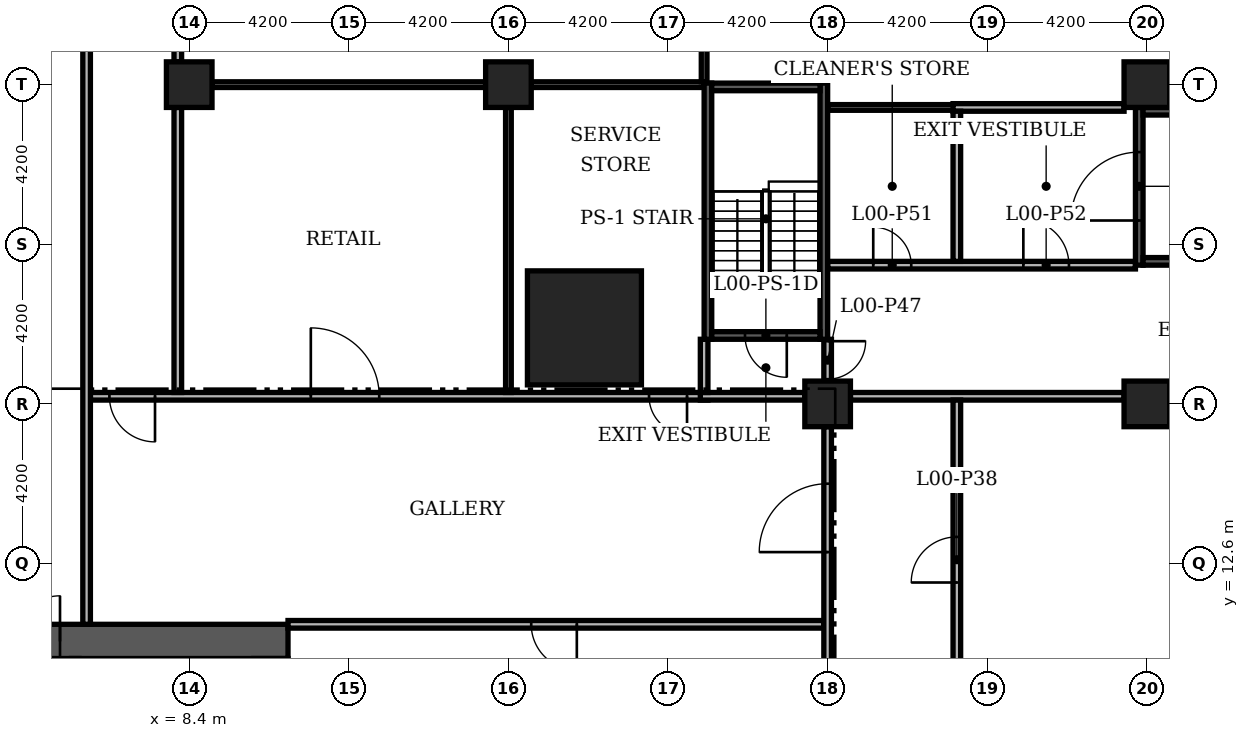
"""IFC4 building model, lengths in metres.
Left out: names, types, materials, properties, quantities, classifications, styles, units other than length and angle.
Written with IfcOpenShell. Run it as: python <this file> out.ifc"""

import sys

from ifc_helpers import new_model, si_unit, direction, frame, frame_2d, origin, origin_2d, place, context, subcontext, project, spatial, rectangle, extrude, element, fill, save


model = new_model("IFC4")
c1 = context("Model", 3, precision=1e-05, world=origin(), true_north=direction((0.0, 1.0)))
c2 = subcontext(c1, "Body", "Model", "MODEL_VIEW")
j1 = project(units=[si_unit("LENGTHUNIT", "METRE"), si_unit("PLANEANGLEUNIT", "RADIAN")], contexts=[c1])
p1 = place(None, origin())
s1 = spatial("IfcSite", under=j1, at=p1, CompositionType="ELEMENT")
p2 = place(p1, origin())
s2 = spatial("IfcBuilding", under=s1, at=p2, CompositionType="ELEMENT")
p3 = place(p2, origin())
s3 = spatial("IfcBuildingStorey", under=s2, at=p3, CompositionType="ELEMENT", Elevation=0.0)
p4 = place(p3, frame((-11.0, 10.55, 0.0), z_axis=(0.0, 0.0, 1.0), x_axis=(1.0, 0.0, 0.0)))
e1 = element("IfcWall", 1, at=p4, inside=s3, PredefinedType="SHEAR", context=c2, shape_type="SweptSolid", body=[
    extrude(rectangle(XDim=22.0, YDim=0.9, at=frame_2d((11.0, 0.0))), origin(), (0.0, 0.0, 1.0), 6.78),
])
p5 = place(p4, frame((12.6, 0.0, 0.0)))
e2 = element("IfcOpeningElement", 2, at=p5, cuts=e1, PredefinedType="OPENING", context=c2, shape_type="SweptSolid", body=[
    extrude(rectangle(XDim=1.2, YDim=2.2, at=frame_2d((0.6, 1.1))), frame((0.0, 0.46, 0.0), z_axis=(0.0, -1.0, 0.0), x_axis=(1.0, 0.0, 0.0)), (0.0, 0.0, 1.0), 0.92),
])
p6 = place(p4, frame((14.8, 0.0, 0.0)))
e3 = element("IfcOpeningElement", 3, at=p6, cuts=e1, PredefinedType="OPENING", context=c2, shape_type="SweptSolid", body=[
    extrude(rectangle(XDim=1.2, YDim=2.2, at=frame_2d((0.6, 1.1))), frame((0.0, 0.46, 0.0), z_axis=(0.0, -1.0, 0.0), x_axis=(1.0, 0.0, 0.0)), (0.0, 0.0, 1.0), 0.92),
])
p7 = place(p3, frame((18.8, 18.8, 0.0), z_axis=(0.0, 0.0, 1.0), x_axis=(1.0, 0.0, 0.0)))
e4 = element("IfcColumn", 4, at=p7, inside=s3, PredefinedType="COLUMN", context=c2, shape_type="SweptSolid", body=[
    extrude(rectangle(XDim=3.0, YDim=3.0, at=origin_2d()), origin(), (0.0, 0.0, 1.0), 7.2),
])
for number, where, z_axis, x_axis in (
    (5, (25.2, 16.8, 0.0), (0.0, 0.0, 1.0), (1.0, 0.0, 0.0)),
    (6, (8.4, 25.2, 0.0), (0.0, 0.0, 1.0), (1.0, 0.0, 0.0)),
    (7, (16.8, 25.2, 0.0), (0.0, 0.0, 1.0), (1.0, 0.0, 0.0)),
    (8, (33.6, 16.8, 0.0), (0.0, 0.0, 1.0), (1.0, 0.0, 0.0)),
    (9, (33.6, 25.2, 0.0), (0.0, 0.0, 1.0), (1.0, 0.0, 0.0)),
):
    element("IfcColumn", number, at=place(p3, frame(where, z_axis=z_axis, x_axis=x_axis)), inside=s3, PredefinedType="COLUMN", context=c2, shape_type="SweptSolid", body=[
        extrude(rectangle(XDim=1.2, YDim=1.2, at=origin_2d()), origin(), (0.0, 0.0, 1.0), 7.2),
    ])
p8 = place(p3, frame((11.0, 11.0, 0.0), z_axis=(0.0, 0.0, 1.0), x_axis=(1.0, 0.0, 0.0)))
e10 = element("IfcWall", 10, at=p8, inside=s3, PredefinedType="PARTITIONING", context=c2, shape_type="SweptSolid", body=[
    extrude(rectangle(XDim=14.1, YDim=0.2, at=frame_2d((7.05, 0.0))), origin(), (0.0, 0.0, 1.0), 6.78),
])
p9 = place(p8, frame((6.4, 0.0, 0.0)))
e11 = element("IfcOpeningElement", 11, at=p9, cuts=e10, PredefinedType="OPENING", context=c2, shape_type="SweptSolid", body=[
    extrude(rectangle(XDim=1.2, YDim=2.2, at=frame_2d((0.6, 1.1))), frame((0.0, 0.11, 0.0), z_axis=(0.0, -1.0, 0.0), x_axis=(1.0, 0.0, 0.0)), (0.0, 0.0, 1.0), 0.22),
])
p10 = place(p3, frame((5.8, 17.0, 0.0), z_axis=(0.0, 0.0, 1.0), x_axis=(1.0, 0.0, 0.0)))
e12 = element("IfcWall", 12, at=p10, inside=s3, PredefinedType="PARTITIONING", context=c2, shape_type="SweptSolid", body=[
    extrude(rectangle(XDim=16.25, YDim=0.2, at=frame_2d((8.125, 0.0))), origin(), (0.0, 0.0, 1.0), 6.78),
])
p11 = place(p10, frame((0.5, 0.0, 0.0)))
e13 = element("IfcOpeningElement", 13, at=p11, cuts=e12, PredefinedType="OPENING", context=c2, shape_type="SweptSolid", body=[
    extrude(rectangle(XDim=1.2, YDim=2.2, at=frame_2d((0.6, 1.1))), frame((0.0, 0.11, 0.0), z_axis=(0.0, -1.0, 0.0), x_axis=(1.0, 0.0, 0.0)), (0.0, 0.0, 1.0), 0.22),
])
p12 = place(p10, frame((5.8, 0.0, 0.0)))
e14 = element("IfcOpeningElement", 14, at=p12, cuts=e12, PredefinedType="OPENING", context=c2, shape_type="SweptSolid", body=[
    extrude(rectangle(XDim=1.8, YDim=2.2, at=frame_2d((0.9, 1.1))), frame((0.0, 0.11, 0.0), z_axis=(0.0, -1.0, 0.0), x_axis=(1.0, 0.0, 0.0)), (0.0, 0.0, 1.0), 0.22),
])
p13 = place(p10, frame((14.7, 0.0, 0.0)))
e15 = element("IfcOpeningElement", 15, at=p13, cuts=e12, PredefinedType="OPENING", context=c2, shape_type="SweptSolid", body=[
    extrude(rectangle(XDim=1.0, YDim=2.1, at=frame_2d((0.5, 1.05))), frame((0.0, 0.11, 0.0), z_axis=(0.0, -1.0, 0.0), x_axis=(1.0, 0.0, 0.0)), (0.0, 0.0, 1.0), 0.22),
])
p14 = place(p3, frame((21.85, 17.0, 0.0), z_axis=(0.0, 0.0, 1.0), x_axis=(1.0, 0.0, 0.0)))
e16 = element("IfcWall", 16, at=p14, inside=s3, PredefinedType="PARTITIONING", context=c2, shape_type="SweptSolid", body=[
    extrude(rectangle(XDim=2.75, YDim=0.2, at=frame_2d((1.375, 0.0))), origin(), (0.0, 0.0, 1.0), 6.78),
])
p15 = place(p3, frame((25.8, 17.0, 0.0), z_axis=(0.0, 0.0, 1.0), x_axis=(1.0, 0.0, 0.0)))
e17 = element("IfcWall", 17, at=p15, inside=s3, PredefinedType="PARTITIONING", context=c2, shape_type="SweptSolid", body=[
    extrude(rectangle(XDim=7.2, YDim=0.2, at=frame_2d((3.6, 0.0))), origin(), (0.0, 0.0, 1.0), 6.48),
])
p16 = place(p3, frame((25.2, 20.45, 0.0), z_axis=(0.0, 0.0, 1.0), x_axis=(1.0, 0.0, 0.0)))
e18 = element("IfcWall", 18, at=p16, inside=s3, PredefinedType="PARTITIONING", context=c2, shape_type="SweptSolid", body=[
    extrude(rectangle(XDim=8.1, YDim=0.2, at=frame_2d((4.05, 0.0))), origin(), (0.0, 0.0, 1.0), 6.78),
])
p17 = place(p16, frame((1.2, 0.0, 0.0)))
e19 = element("IfcOpeningElement", 19, at=p17, cuts=e18, PredefinedType="OPENING", context=c2, shape_type="SweptSolid", body=[
    extrude(rectangle(XDim=1.0, YDim=2.1, at=frame_2d((0.5, 1.05))), frame((0.0, 0.11, 0.0), z_axis=(0.0, -1.0, 0.0), x_axis=(1.0, 0.0, 0.0)), (0.0, 0.0, 1.0), 0.22),
])
p18 = place(p16, frame((5.15, 0.0, 0.0)))
e20 = element("IfcOpeningElement", 20, at=p18, cuts=e18, PredefinedType="OPENING", context=c2, shape_type="SweptSolid", body=[
    extrude(rectangle(XDim=1.2, YDim=2.2, at=frame_2d((0.6, 1.1))), frame((0.0, 0.11, 0.0), z_axis=(0.0, -1.0, 0.0), x_axis=(1.0, 0.0, 0.0)), (0.0, 0.0, 1.0), 0.22),
])
p19 = place(p3, frame((25.2, 24.6, 0.0), z_axis=(0.0, 0.0, 1.0), x_axis=(1.0, 0.0, 0.0)))
e21 = element("IfcWall", 21, at=p19, inside=s3, PredefinedType="PARTITIONING", context=c2, shape_type="SweptSolid", body=[
    extrude(rectangle(XDim=3.5, YDim=0.15, at=frame_2d((1.75, 0.0))), origin(), (0.0, 0.0, 1.0), 6.78),
])
p20 = place(p3, frame((28.5, 24.6, 0.0), z_axis=(0.0, 0.0, 1.0), x_axis=(1.0, 0.0, 0.0)))
e22 = element("IfcWall", 22, at=p20, inside=s3, PredefinedType="PARTITIONING", context=c2, shape_type="SweptSolid", body=[
    extrude(rectangle(XDim=4.5, YDim=0.2, at=frame_2d((2.25, 0.0))), origin(), (0.0, 0.0, 1.0), 6.78),
])
p21 = place(p3, frame((9.0, 25.2, 0.0), z_axis=(0.0, 0.0, 1.0), x_axis=(1.0, 0.0, 0.0)))
e23 = element("IfcWall", 23, at=p21, inside=s3, PredefinedType="PARTITIONING", context=c2, shape_type="SweptSolid", body=[
    extrude(rectangle(XDim=7.2, YDim=0.15, at=frame_2d((3.6, 0.0))), origin(), (0.0, 0.0, 1.0), 6.48),
])
p22 = place(p3, frame((17.4, 25.2, 0.0), z_axis=(0.0, 0.0, 1.0), x_axis=(1.0, 0.0, 0.0)))
e24 = element("IfcWall", 24, at=p22, inside=s3, PredefinedType="PARTITIONING", context=c2, shape_type="SweptSolid", body=[
    extrude(rectangle(XDim=4.55, YDim=0.15, at=frame_2d((2.275, 0.0))), origin(), (0.0, 0.0, 1.0), 6.48),
])
p23 = place(p3, frame((5.7, 11.0, 0.0), z_axis=(0.0, 0.0, 1.0), x_axis=(0.0, 1.0, 0.0)))
e25 = element("IfcWall", 25, at=p23, inside=s3, PredefinedType="PARTITIONING", context=c2, shape_type="SweptSolid", body=[
    extrude(rectangle(XDim=35.55, YDim=0.2, at=frame_2d((17.775, 0.0))), origin(), (0.0, 0.0, 1.0), 6.48),
])
p24 = place(p3, frame((8.1, 17.1, 0.0), z_axis=(0.0, 0.0, 1.0), x_axis=(0.0, 1.0, 0.0)))
e26 = element("IfcWall", 26, at=p24, inside=s3, PredefinedType="PARTITIONING", context=c2, shape_type="SweptSolid", body=[
    extrude(rectangle(XDim=7.5, YDim=0.2, at=frame_2d((3.75, 0.0))), origin(), (0.0, 0.0, 1.0), 6.78),
])
p25 = place(p3, frame((8.1, 25.8, 0.0), z_axis=(0.0, 0.0, 1.0), x_axis=(0.0, 1.0, 0.0)))
e27 = element("IfcWall", 27, at=p25, inside=s3, PredefinedType="PARTITIONING", context=c2, shape_type="SweptSolid", body=[
    extrude(rectangle(XDim=7.2, YDim=0.2, at=frame_2d((3.6, 0.0))), origin(), (0.0, 0.0, 1.0), 6.78),
])
p26 = place(p25, frame((3.0, 0.0, 0.0)))
e28 = element("IfcOpeningElement", 28, at=p26, cuts=e27, PredefinedType="OPENING", context=c2, shape_type="SweptSolid", body=[
    extrude(rectangle(XDim=1.2, YDim=2.2, at=frame_2d((0.6, 1.1))), frame((0.0, 0.11, 0.0), z_axis=(0.0, -1.0, 0.0), x_axis=(1.0, 0.0, 0.0)), (0.0, 0.0, 1.0), 0.22),
])
p27 = place(p3, frame((16.8, 17.1, 0.0), z_axis=(0.0, 0.0, 1.0), x_axis=(0.0, 1.0, 0.0)))
e29 = element("IfcWall", 29, at=p27, inside=s3, PredefinedType="PARTITIONING", context=c2, shape_type="SweptSolid", body=[
    extrude(rectangle(XDim=7.5, YDim=0.15, at=frame_2d((3.75, 0.0))), origin(), (0.0, 0.0, 1.0), 6.78),
])
p28 = place(p3, frame((21.95, 17.1, 0.0), z_axis=(0.0, 0.0, 1.0), x_axis=(0.0, 1.0, 0.0)))
e30 = element("IfcWall", 30, at=p28, inside=s3, PredefinedType="PARTITIONING", context=c2, shape_type="SweptSolid", body=[
    extrude(rectangle(XDim=1.4, YDim=0.2, at=frame_2d((0.7, 0.0))), origin(), (0.0, 0.0, 1.0), 6.78),
])
p29 = place(p3, frame((21.95, 25.275, 0.0), z_axis=(0.0, 0.0, 1.0), x_axis=(0.0, 1.0, 0.0)))
e31 = element("IfcWall", 31, at=p29, inside=s3, PredefinedType="PARTITIONING", context=c2, shape_type="SweptSolid", body=[
    extrude(rectangle(XDim=7.725, YDim=0.15, at=frame_2d((3.863, 0.0))), origin(), (0.0, 0.0, 1.0), 6.78),
])
p30 = place(p3, frame((25.2, 9.0, 0.0), z_axis=(0.0, 0.0, 1.0), x_axis=(0.0, 1.0, 0.0)))
e32 = element("IfcWall", 32, at=p30, inside=s3, PredefinedType="PARTITIONING", context=c2, shape_type="SweptSolid", body=[
    extrude(rectangle(XDim=7.2, YDim=0.2, at=frame_2d((3.6, 0.0))), origin(), (0.0, 0.0, 1.0), 6.48),
])
p31 = place(p30, frame((3.9, 0.0, 0.0)))
e33 = element("IfcOpeningElement", 33, at=p31, cuts=e32, PredefinedType="OPENING", context=c2, shape_type="SweptSolid", body=[
    extrude(rectangle(XDim=1.8, YDim=2.2, at=frame_2d((0.9, 1.1))), frame((0.0, 0.11, 0.0), z_axis=(0.0, -1.0, 0.0), x_axis=(1.0, 0.0, 0.0)), (0.0, 0.0, 1.0), 0.22),
])
p32 = place(p3, frame((25.2, 17.4, 0.0), z_axis=(0.0, 0.0, 1.0), x_axis=(0.0, 1.0, 0.0)))
e34 = element("IfcWall", 34, at=p32, inside=s3, PredefinedType="PARTITIONING", context=c2, shape_type="SweptSolid", body=[
    extrude(rectangle(XDim=1.1, YDim=0.2, at=frame_2d((0.55, 0.0))), origin(), (0.0, 0.0, 1.0), 6.38),
])
p33 = place(p32, frame((0.05, 0.0, 0.0)))
e35 = element("IfcOpeningElement", 35, at=p33, cuts=e34, PredefinedType="OPENING", context=c2, shape_type="SweptSolid", body=[
    extrude(rectangle(XDim=1.0, YDim=2.2, at=frame_2d((0.5, 1.1))), frame((0.0, 0.11, 0.0), z_axis=(0.0, -1.0, 0.0), x_axis=(1.0, 0.0, 0.0)), (0.0, 0.0, 1.0), 0.22),
])
p34 = place(p3, frame((28.6, -16.9, 0.0), z_axis=(0.0, 0.0, 1.0), x_axis=(0.0, 1.0, 0.0)))
e36 = element("IfcWall", 36, at=p34, inside=s3, PredefinedType="PARTITIONING", context=c2, shape_type="SweptSolid", body=[
    extrude(rectangle(XDim=33.8, YDim=0.2, at=frame_2d((16.9, 0.0))), origin(), (0.0, 0.0, 1.0), 6.48),
])
p35 = place(p34, frame((3.6, 0.0, 0.0)))
e37 = element("IfcOpeningElement", 37, at=p35, cuts=e36, PredefinedType="OPENING", context=c2, shape_type="SweptSolid", body=[
    extrude(rectangle(XDim=1.2, YDim=2.2, at=frame_2d((0.6, 1.1))), frame((0.0, 0.11, 0.0), z_axis=(0.0, -1.0, 0.0), x_axis=(1.0, 0.0, 0.0)), (0.0, 0.0, 1.0), 0.22),
])
p36 = place(p34, frame((12.1, 0.0, 0.0)))
e38 = element("IfcOpeningElement", 38, at=p36, cuts=e36, PredefinedType="OPENING", context=c2, shape_type="SweptSolid", body=[
    extrude(rectangle(XDim=1.2, YDim=2.2, at=frame_2d((0.6, 1.1))), frame((0.0, 0.11, 0.0), z_axis=(0.0, -1.0, 0.0), x_axis=(1.0, 0.0, 0.0)), (0.0, 0.0, 1.0), 0.22),
])
p37 = place(p34, frame((20.5, 0.0, 0.0)))
e39 = element("IfcOpeningElement", 39, at=p37, cuts=e36, PredefinedType="OPENING", context=c2, shape_type="SweptSolid", body=[
    extrude(rectangle(XDim=1.2, YDim=2.2, at=frame_2d((0.6, 1.1))), frame((0.0, 0.11, 0.0), z_axis=(0.0, -1.0, 0.0), x_axis=(1.0, 0.0, 0.0)), (0.0, 0.0, 1.0), 0.22),
])
p38 = place(p34, frame((29.0, 0.0, 0.0)))
e40 = element("IfcOpeningElement", 40, at=p38, cuts=e36, PredefinedType="OPENING", context=c2, shape_type="SweptSolid", body=[
    extrude(rectangle(XDim=1.2, YDim=2.2, at=frame_2d((0.6, 1.1))), frame((0.0, 0.11, 0.0), z_axis=(0.0, -1.0, 0.0), x_axis=(1.0, 0.0, 0.0)), (0.0, 0.0, 1.0), 0.22),
])
p39 = place(p3, frame((28.6, 20.55, 0.0), z_axis=(0.0, 0.0, 1.0), x_axis=(0.0, 1.0, 0.0)))
e41 = element("IfcWall", 41, at=p39, inside=s3, PredefinedType="PARTITIONING", context=c2, shape_type="SweptSolid", body=[
    extrude(rectangle(XDim=3.95, YDim=0.2, at=frame_2d((1.975, 0.0))), origin(), (0.0, 0.0, 1.0), 6.78),
])
p40 = place(p3, frame((22.05, 18.5, 0.0), z_axis=(0.0, 0.0, 1.0), x_axis=(0.0, 1.0, 0.0)))
e42 = element("IfcWall", 42, at=p40, inside=s3, PredefinedType="SOLIDWALL", context=c2, shape_type="SweptSolid", body=[
    extrude(rectangle(XDim=6.74, YDim=0.2, at=frame_2d((3.37, 0.0))), origin(), (0.0, 0.0, 1.0), 6.78),
])
p41 = place(p3, frame((25.1, 18.5, 0.0), z_axis=(0.0, 0.0, 1.0), x_axis=(0.0, 1.0, 0.0)))
e43 = element("IfcWall", 43, at=p41, inside=s3, PredefinedType="SOLIDWALL", context=c2, shape_type="SweptSolid", body=[
    extrude(rectangle(XDim=6.74, YDim=0.2, at=frame_2d((3.37, 0.0))), origin(), (0.0, 0.0, 1.0), 6.38),
])
p42 = place(p3, frame((22.15, 18.6, 0.0), z_axis=(0.0, 0.0, 1.0), x_axis=(1.0, 0.0, 0.0)))
e44 = element("IfcWall", 44, at=p42, inside=s3, PredefinedType="SOLIDWALL", context=c2, shape_type="SweptSolid", body=[
    extrude(rectangle(XDim=2.85, YDim=0.2, at=frame_2d((1.425, 0.0))), origin(), (0.0, 0.0, 1.0), 6.78),
])
p43 = place(p42, frame((0.875, 0.0, 0.0)))
e45 = element("IfcOpeningElement", 45, at=p43, cuts=e44, PredefinedType="OPENING", context=c2, shape_type="SweptSolid", body=[
    extrude(rectangle(XDim=1.1, YDim=2.2, at=frame_2d((0.55, 1.1))), frame((0.0, 0.11, 0.0), z_axis=(0.0, -1.0, 0.0), x_axis=(1.0, 0.0, 0.0)), (0.0, 0.0, 1.0), 0.22),
])
p44 = place(p3, frame((22.15, 25.14, 0.0), z_axis=(0.0, 0.0, 1.0), x_axis=(1.0, 0.0, 0.0)))
e46 = element("IfcWall", 46, at=p44, inside=s3, PredefinedType="SOLIDWALL", context=c2, shape_type="SweptSolid", body=[
    extrude(rectangle(XDim=2.85, YDim=0.2, at=frame_2d((1.425, 0.0))), origin(), (0.0, 0.0, 1.0), 6.48),
])
p45 = place(p3, frame((33.4, 20.45, 0.0), z_axis=(0.0, 0.0, 1.0), x_axis=(0.0, 1.0, 0.0)))
e47 = element("IfcWall", 47, at=p45, inside=s3, PredefinedType="SOLIDWALL", context=c2, shape_type="SweptSolid", body=[
    extrude(rectangle(XDim=4.15, YDim=0.2, at=frame_2d((2.075, 0.0))), origin(), (0.0, 0.0, 1.0), 6.38),
])
p46 = place(p45, frame((1.175, 0.0, 0.0)))
e48 = element("IfcOpeningElement", 48, at=p46, cuts=e47, PredefinedType="OPENING", context=c2, shape_type="SweptSolid", body=[
    extrude(rectangle(XDim=1.8, YDim=2.2, at=frame_2d((0.9, 1.1))), frame((0.0, 0.11, 0.0), z_axis=(0.0, -1.0, 0.0), x_axis=(1.0, 0.0, 0.0)), (0.0, 0.0, 1.0), 0.22),
])
for number, where, z_axis, x_axis in (
    (49, (33.5, 20.55, 0.0), (0.0, 0.0, 1.0), (1.0, 0.0, 0.0)),
    (50, (33.5, 24.5, 0.0), (0.0, 0.0, 1.0), (1.0, 0.0, 0.0)),
):
    element("IfcWall", number, at=place(p3, frame(where, z_axis=z_axis, x_axis=x_axis)), inside=s3, PredefinedType="SOLIDWALL", context=c2, shape_type="SweptSolid", body=[
        extrude(rectangle(XDim=8.2, YDim=0.2, at=frame_2d((4.1, 0.0))), origin(), (0.0, 0.0, 1.0), 7.0),
    ])
p47 = place(p6, origin())
e51 = element("IfcDoor", 51, at=p47, inside=s3, OperationType="SINGLE_SWING_RIGHT", PredefinedType="DOOR", context=c2, shape_type="SweptSolid", body=[
    extrude(rectangle(XDim=1.2, YDim=2.2, at=frame_2d((0.6, 1.1))), frame((0.0, 0.025, 0.0), z_axis=(0.0, -1.0, 0.0), x_axis=(1.0, 0.0, 0.0)), (0.0, 0.0, 1.0), 0.05),
])
fill(e3, e51)
p48 = place(p9, origin())
e52 = element("IfcDoor", 52, at=p48, inside=s3, OperationType="SINGLE_SWING_RIGHT", PredefinedType="DOOR", context=c2, shape_type="SweptSolid", body=[
    extrude(rectangle(XDim=1.2, YDim=2.2, at=frame_2d((0.6, 1.1))), frame((0.0, 0.025, 0.0), z_axis=(0.0, -1.0, 0.0), x_axis=(1.0, 0.0, 0.0)), (0.0, 0.0, 1.0), 0.05),
])
fill(e11, e52)
p49 = place(p38, origin())
e53 = element("IfcDoor", 53, at=p49, inside=s3, OperationType="SINGLE_SWING_LEFT", PredefinedType="DOOR", context=c2, shape_type="SweptSolid", body=[
    extrude(rectangle(XDim=1.2, YDim=2.2, at=frame_2d((0.6, 1.1))), frame((0.0, 0.025, 0.0), z_axis=(0.0, -1.0, 0.0), x_axis=(1.0, 0.0, 0.0)), (0.0, 0.0, 1.0), 0.05),
])
fill(e40, e53)
p50 = place(p31, origin())
e54 = element("IfcDoor", 54, at=p50, inside=s3, OperationType="DOUBLE_DOOR_SINGLE_SWING", PredefinedType="DOOR", context=c2, shape_type="SweptSolid", body=[
    extrude(rectangle(XDim=1.8, YDim=2.2, at=frame_2d((0.9, 1.1))), frame((0.0, 0.025, 0.0), z_axis=(0.0, -1.0, 0.0), x_axis=(1.0, 0.0, 0.0)), (0.0, 0.0, 1.0), 0.05),
])
fill(e33, e54)
p51 = place(p11, origin())
e55 = element("IfcDoor", 55, at=p51, inside=s3, OperationType="SINGLE_SWING_RIGHT", PredefinedType="DOOR", context=c2, shape_type="SweptSolid", body=[
    extrude(rectangle(XDim=1.2, YDim=2.2, at=frame_2d((0.6, 1.1))), frame((0.0, 0.025, 0.0), z_axis=(0.0, -1.0, 0.0), x_axis=(1.0, 0.0, 0.0)), (0.0, 0.0, 1.0), 0.05),
])
fill(e13, e55)
p52 = place(p12, origin())
e56 = element("IfcDoor", 56, at=p52, inside=s3, OperationType="DOUBLE_DOOR_SINGLE_SWING", PredefinedType="DOOR", context=c2, shape_type="SweptSolid", body=[
    extrude(rectangle(XDim=1.8, YDim=2.2, at=frame_2d((0.9, 1.1))), frame((0.0, 0.025, 0.0), z_axis=(0.0, -1.0, 0.0), x_axis=(1.0, 0.0, 0.0)), (0.0, 0.0, 1.0), 0.05),
])
fill(e14, e56)
p53 = place(p13, origin())
e57 = element("IfcDoor", 57, at=p53, inside=s3, OperationType="SINGLE_SWING_RIGHT", PredefinedType="DOOR", context=c2, shape_type="SweptSolid", body=[
    extrude(rectangle(XDim=1.0, YDim=2.1, at=frame_2d((0.5, 1.05))), frame((0.0, 0.025, 0.0), z_axis=(0.0, -1.0, 0.0), x_axis=(1.0, 0.0, 0.0)), (0.0, 0.0, 1.0), 0.05),
])
fill(e15, e57)
p54 = place(p33, origin())
e58 = element("IfcDoor", 58, at=p54, inside=s3, OperationType="SINGLE_SWING_RIGHT", PredefinedType="DOOR", context=c2, shape_type="SweptSolid", body=[
    extrude(rectangle(XDim=1.0, YDim=2.2, at=frame_2d((0.5, 1.1))), frame((0.0, 0.025, 0.0), z_axis=(0.0, -1.0, 0.0), x_axis=(1.0, 0.0, 0.0)), (0.0, 0.0, 1.0), 0.05),
])
fill(e35, e58)
p55 = place(p17, origin())
e59 = element("IfcDoor", 59, at=p55, inside=s3, OperationType="SINGLE_SWING_LEFT", PredefinedType="DOOR", context=c2, shape_type="SweptSolid", body=[
    extrude(rectangle(XDim=1.0, YDim=2.1, at=frame_2d((0.5, 1.05))), frame((0.0, 0.025, 0.0), z_axis=(0.0, -1.0, 0.0), x_axis=(1.0, 0.0, 0.0)), (0.0, 0.0, 1.0), 0.05),
])
fill(e19, e59)
p56 = place(p18, origin())
e60 = element("IfcDoor", 60, at=p56, inside=s3, OperationType="SINGLE_SWING_LEFT", PredefinedType="DOOR", context=c2, shape_type="SweptSolid", body=[
    extrude(rectangle(XDim=1.2, YDim=2.2, at=frame_2d((0.6, 1.1))), frame((0.0, 0.025, 0.0), z_axis=(0.0, -1.0, 0.0), x_axis=(1.0, 0.0, 0.0)), (0.0, 0.0, 1.0), 0.05),
])
fill(e20, e60)
p57 = place(p43, origin())
e61 = element("IfcDoor", 61, at=p57, inside=s3, OperationType="SINGLE_SWING_RIGHT", PredefinedType="DOOR", context=c2, shape_type="SweptSolid", body=[
    extrude(rectangle(XDim=1.1, YDim=2.2, at=frame_2d((0.55, 1.1))), frame((0.0, 0.025, 0.0), z_axis=(0.0, -1.0, 0.0), x_axis=(1.0, 0.0, 0.0)), (0.0, 0.0, 1.0), 0.05),
])
fill(e45, e61)
p58 = place(p46, origin())
e62 = element("IfcDoor", 62, at=p58, inside=s3, OperationType="DOUBLE_DOOR_SINGLE_SWING", PredefinedType="DOOR", context=c2, shape_type="SweptSolid", body=[
    extrude(rectangle(XDim=1.8, YDim=2.2, at=frame_2d((0.9, 1.1))), frame((0.0, 0.025, 0.0), z_axis=(0.0, -1.0, 0.0), x_axis=(1.0, 0.0, 0.0)), (0.0, 0.0, 1.0), 0.05),
])
fill(e48, e62)
save(model, sys.argv[1])
